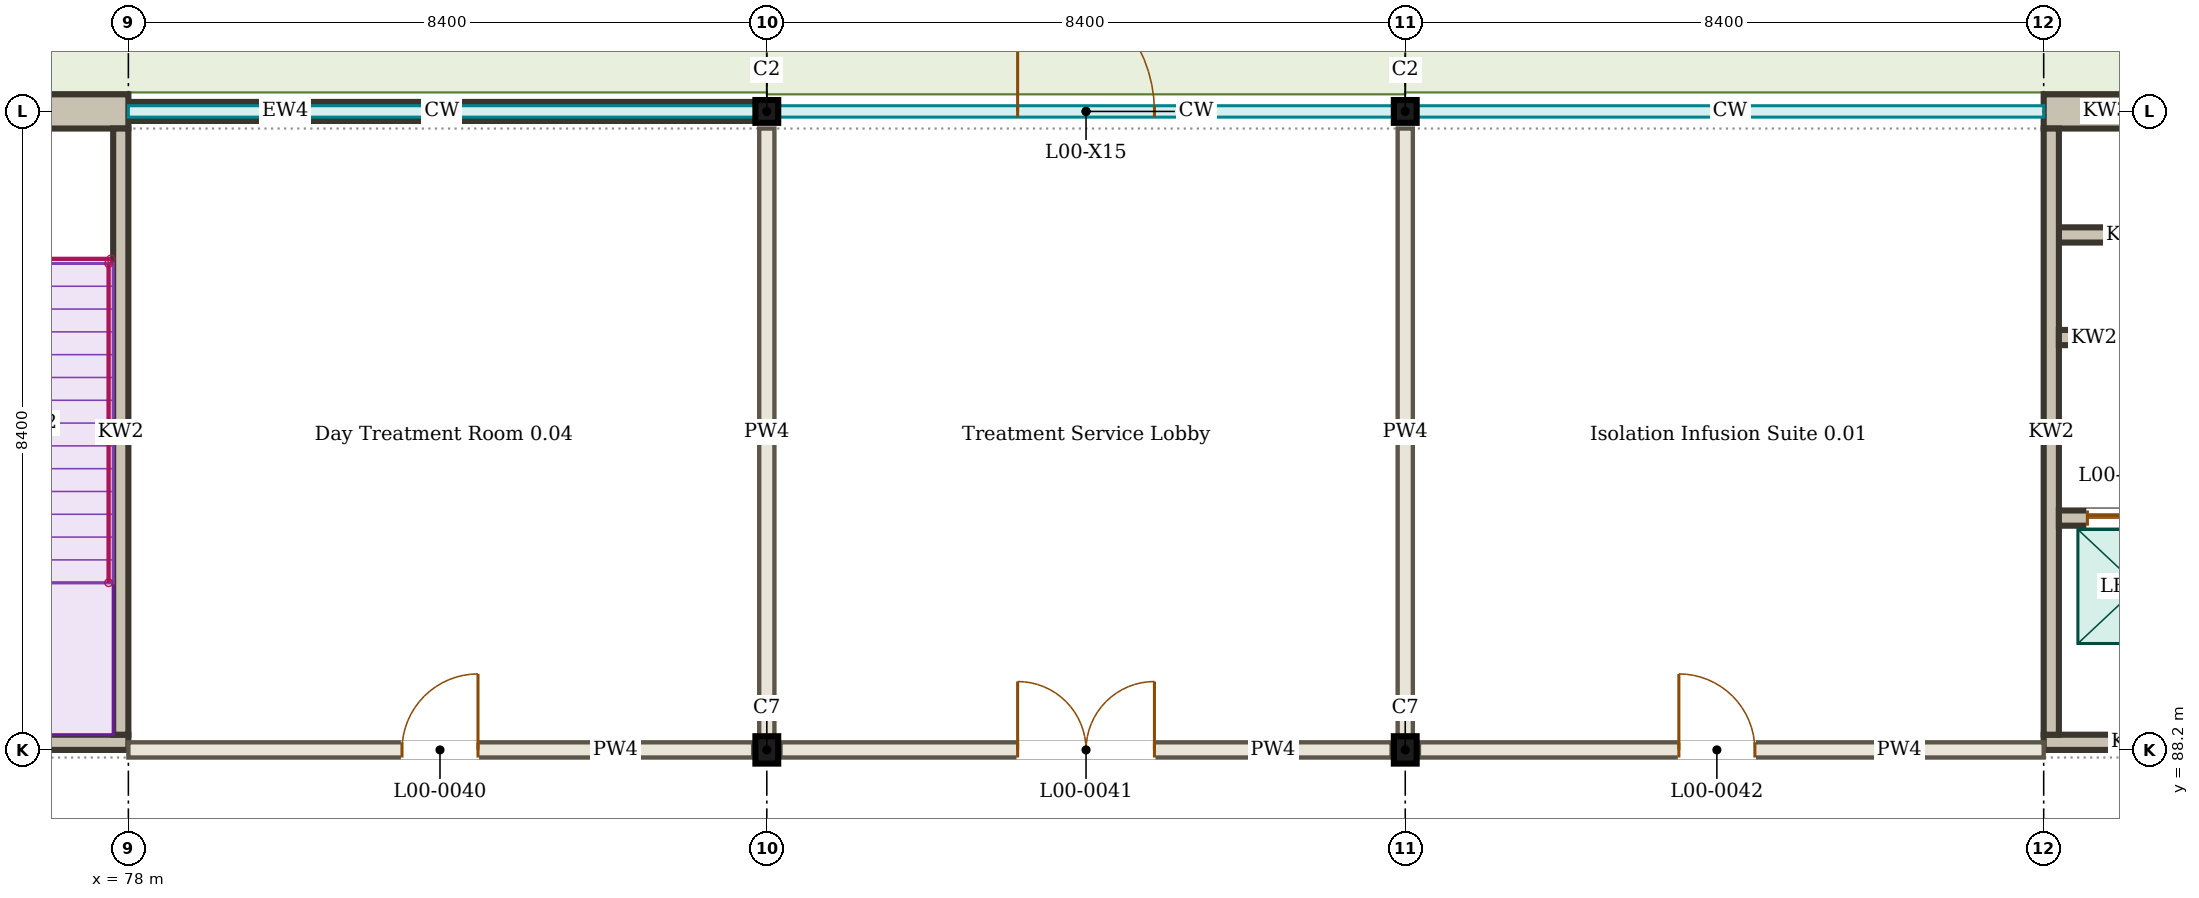
"""IFC4 building model, lengths in metres.
Left out: names, types, materials, properties, quantities, classifications, styles, units other than length and angle.
Written with IfcOpenShell. Run it as: python <this file> out.ifc"""

import sys

from ifc_helpers import new_model, si_unit, direction, frame, frame_2d, origin, origin_2d, place, context, subcontext, project, spatial, rectangle, i_section, extrude, element, fill, save


model = new_model("IFC4")
c1 = context("Model", 3, precision=1e-05, world=origin(), true_north=direction((0.0, 1.0)))
c2 = subcontext(c1, "Body", "Model", "MODEL_VIEW")
j1 = project(units=[si_unit("LENGTHUNIT", "METRE"), si_unit("PLANEANGLEUNIT", "RADIAN")], contexts=[c1])
p1 = place(None, origin())
s1 = spatial("IfcSite", under=j1, at=p1, CompositionType="ELEMENT")
p2 = place(p1, origin())
s2 = spatial("IfcBuilding", under=s1, at=p2, CompositionType="ELEMENT")
p3 = place(p2, origin())
s3 = spatial("IfcBuildingStorey", under=s2, at=p3, CompositionType="ELEMENT", Elevation=0.0)
for number, where, z_axis, x_axis in (
    (1, (86.4, 88.2, 0.0), (0.0, 0.0, 1.0), (1.0, 0.0, 0.0)),
    (2, (94.8, 88.2, 0.0), (0.0, 0.0, 1.0), (1.0, 0.0, 0.0)),
):
    element("IfcColumn", number, at=place(p3, frame(where, z_axis=z_axis, x_axis=x_axis)), inside=s3, PredefinedType="COLUMN", context=c2, shape_type="SweptSolid", body=[
        extrude(i_section(OverallWidth=0.3, OverallDepth=0.36, WebThickness=0.012, FlangeThickness=0.022, FilletRadius=0.027, at=origin_2d()), origin(), (0.0, 0.0, 1.0), 4.5),
    ])
for number, where, z_axis, x_axis in (
    (3, (86.4, 96.6, 0.0), (0.0, 0.0, 1.0), (1.0, 0.0, 0.0)),
    (4, (94.8, 96.6, 0.0), (0.0, 0.0, 1.0), (1.0, 0.0, 0.0)),
):
    element("IfcColumn", number, at=place(p3, frame(where, z_axis=z_axis, x_axis=x_axis)), inside=s3, PredefinedType="COLUMN", context=c2, shape_type="SweptSolid", body=[
        extrude(i_section(OverallWidth=0.3, OverallDepth=0.3, WebThickness=0.011, FlangeThickness=0.019, FilletRadius=0.027, at=origin_2d()), origin(), (0.0, 0.0, 1.0), 4.5),
    ])
p4 = place(p3, frame((78.0, 96.6, 0.0), z_axis=(0.0, 0.0, 1.0), x_axis=(1.0, 0.0, 0.0)))
e5 = element("IfcWall", 5, at=p4, inside=s3, PredefinedType="SOLIDWALL", context=c2, shape_type="SweptSolid", body=[
    extrude(rectangle(XDim=8.25, YDim=0.25, at=frame_2d((4.125, 0.0))), origin(), (0.0, 0.0, 1.0), 0.45),
])
for number, where, z_axis, x_axis in (
    (6, (78.0, 96.76, 3.87), (0.0, 0.0, 1.0), (1.0, 0.0, 0.0)),
    (7, (86.55, 96.76, 3.87), (0.0, 0.0, 1.0), (1.0, 0.0, 0.0)),
):
    element("IfcWall", number, at=place(p3, frame(where, z_axis=z_axis, x_axis=x_axis)), inside=s3, PredefinedType="SOLIDWALL", context=c2, shape_type="SweptSolid", body=[
        extrude(rectangle(XDim=8.25, YDim=0.13, at=frame_2d((4.125, 0.0))), origin(), (0.0, 0.0, 1.0), 0.63),
    ])
p5 = place(p3, frame((78.0, 88.2, 0.0), z_axis=(0.0, 0.0, 1.0), x_axis=(1.0, 0.0, 0.0)))
e8 = element("IfcWall", 8, at=p5, inside=s3, PredefinedType="PARTITIONING", context=c2, shape_type="SweptSolid", body=[
    extrude(rectangle(XDim=8.22, YDim=0.2, at=frame_2d((4.11, 0.0))), origin(), (0.0, 0.0, 1.0), 3.8),
])
p6 = place(p5, frame((3.6, 0.0, 0.0)))
e9 = element("IfcOpeningElement", 9, at=p6, cuts=e8, PredefinedType="OPENING", context=c2, shape_type="SweptSolid", body=[
    extrude(rectangle(XDim=1.0, YDim=2.1, at=frame_2d((0.5, 1.05))), frame((0.0, 0.11, 0.0), z_axis=(0.0, -1.0, 0.0), x_axis=(1.0, 0.0, 0.0)), (0.0, 0.0, 1.0), 0.22),
])
p7 = place(p3, frame((86.58, 88.2, 0.0), z_axis=(0.0, 0.0, 1.0), x_axis=(1.0, 0.0, 0.0)))
e10 = element("IfcWall", 10, at=p7, inside=s3, PredefinedType="PARTITIONING", context=c2, shape_type="SweptSolid", body=[
    extrude(rectangle(XDim=8.04, YDim=0.2, at=frame_2d((4.02, 0.0))), origin(), (0.0, 0.0, 1.0), 3.8),
])
p8 = place(p7, frame((3.12, 0.0, 0.0)))
e11 = element("IfcOpeningElement", 11, at=p8, cuts=e10, PredefinedType="OPENING", context=c2, shape_type="SweptSolid", body=[
    extrude(rectangle(XDim=1.8, YDim=2.1, at=frame_2d((0.9, 1.05))), frame((0.0, 0.11, 0.0), z_axis=(0.0, -1.0, 0.0), x_axis=(1.0, 0.0, 0.0)), (0.0, 0.0, 1.0), 0.22),
])
p9 = place(p3, frame((94.98, 88.2, 0.0), z_axis=(0.0, 0.0, 1.0), x_axis=(1.0, 0.0, 0.0)))
e12 = element("IfcWall", 12, at=p9, inside=s3, PredefinedType="PARTITIONING", context=c2, shape_type="SweptSolid", body=[
    extrude(rectangle(XDim=8.22, YDim=0.2, at=frame_2d((4.11, 0.0))), origin(), (0.0, 0.0, 1.0), 3.8),
])
p10 = place(p9, frame((3.42, 0.0, 0.0)))
e13 = element("IfcOpeningElement", 13, at=p10, cuts=e12, PredefinedType="OPENING", context=c2, shape_type="SweptSolid", body=[
    extrude(rectangle(XDim=1.0, YDim=2.1, at=frame_2d((0.5, 1.05))), frame((0.0, 0.11, 0.0), z_axis=(0.0, -1.0, 0.0), x_axis=(1.0, 0.0, 0.0)), (0.0, 0.0, 1.0), 0.22),
])
for number, where, z_axis, x_axis in (
    (14, (86.4, 88.38, 0.0), (0.0, 0.0, 1.0), (0.0, 1.0, 0.0)),
    (15, (94.8, 88.38, 0.0), (0.0, 0.0, 1.0), (0.0, 1.0, 0.0)),
):
    element("IfcWall", number, at=place(p3, frame(where, z_axis=z_axis, x_axis=x_axis)), inside=s3, PredefinedType="PARTITIONING", context=c2, shape_type="SweptSolid", body=[
        extrude(rectangle(XDim=7.995, YDim=0.2, at=frame_2d((3.998, 0.0))), origin(), (0.0, 0.0, 1.0), 3.8),
    ])
p11 = place(p3, frame((111.6, 88.3, 0.0), z_axis=(0.0, 0.0, 1.0), x_axis=(-1.0, 0.0, 0.0)))
e16 = element("IfcWall", 16, at=p11, inside=s3, PredefinedType="SOLIDWALL", context=c2, shape_type="SweptSolid", body=[
    extrude(rectangle(XDim=8.4, YDim=0.2, at=frame_2d((4.2, 0.0))), origin(), (0.0, 0.0, 1.0), 4.5),
])
p12 = place(p11, frame((4.725, 0.0, 0.0)))
e17 = element("IfcOpeningElement", 17, at=p12, cuts=e16, PredefinedType="OPENING", context=c2, shape_type="SweptSolid", body=[
    extrude(rectangle(XDim=1.3, YDim=2.1, at=frame_2d((0.65, 1.05))), frame((0.0, 0.11, 0.0), z_axis=(0.0, -1.0, 0.0), x_axis=(1.0, 0.0, 0.0)), (0.0, 0.0, 1.0), 0.22),
])
p13 = place(p3, frame((111.825, 96.6, 0.0), z_axis=(0.0, 0.0, 1.0), x_axis=(-1.0, 0.0, 0.0)))
e18 = element("IfcWall", 18, at=p13, inside=s3, PredefinedType="SOLIDWALL", context=c2, shape_type="SweptSolid", body=[
    extrude(rectangle(XDim=8.625, YDim=0.45, at=frame_2d((4.312, 0.0))), origin(), (0.0, 0.0, 1.0), 4.5),
])
p14 = place(p13, frame((1.875, 0.0, 0.0)))
e19 = element("IfcOpeningElement", 19, at=p14, cuts=e18, PredefinedType="OPENING", context=c2, shape_type="SweptSolid", body=[
    extrude(rectangle(XDim=1.3, YDim=2.1, at=frame_2d((0.65, 1.05))), frame((0.0, 0.235, 0.0), z_axis=(0.0, -1.0, 0.0), x_axis=(1.0, 0.0, 0.0)), (0.0, 0.0, 1.0), 0.47),
])
p15 = place(p3, frame((103.3, 88.4, 0.0), z_axis=(0.0, 0.0, 1.0), x_axis=(0.0, 1.0, 0.0)))
e20 = element("IfcWall", 20, at=p15, inside=s3, PredefinedType="SOLIDWALL", context=c2, shape_type="SweptSolid", body=[
    extrude(rectangle(XDim=7.975, YDim=0.2, at=frame_2d((3.988, 0.0))), origin(), (0.0, 0.0, 1.0), 4.5),
])
p16 = place(p3, frame((105.25, 91.25, 0.0), z_axis=(0.0, 0.0, 1.0), x_axis=(-1.0, 0.0, 0.0)))
e21 = element("IfcWall", 21, at=p16, inside=s3, PredefinedType="SOLIDWALL", context=c2, shape_type="SweptSolid", body=[
    extrude(rectangle(XDim=1.85, YDim=0.2, at=frame_2d((0.925, 0.0))), origin(), (0.0, 0.0, 1.0), 4.5),
])
p17 = place(p16, frame((0.375, 0.0, 0.0)))
e22 = element("IfcOpeningElement", 22, at=p17, cuts=e21, PredefinedType="OPENING", context=c2, shape_type="SweptSolid", body=[
    extrude(rectangle(XDim=1.1, YDim=2.1, at=frame_2d((0.55, 1.05))), frame((0.0, 0.11, 0.0), z_axis=(0.0, -1.0, 0.0), x_axis=(1.0, 0.0, 0.0)), (0.0, 0.0, 1.0), 0.22),
])
for number, where, z_axis, x_axis in (
    (23, (105.25, 93.625, 0.0), (0.0, 0.0, 1.0), (-1.0, 0.0, 0.0)),
    (24, (105.25, 94.975, 0.0), (0.0, 0.0, 1.0), (-1.0, 0.0, 0.0)),
):
    element("IfcWall", number, at=place(p3, frame(where, z_axis=z_axis, x_axis=x_axis)), inside=s3, PredefinedType="SOLIDWALL", context=c2, shape_type="SweptSolid", body=[
        extrude(rectangle(XDim=1.85, YDim=0.2, at=frame_2d((0.925, 0.0))), origin(), (0.0, 0.0, 1.0), 4.35),
    ])
p18 = place(p3, frame((78.0, 88.3, 0.0), z_axis=(0.0, 0.0, 1.0), x_axis=(-1.0, 0.0, 0.0)))
e25 = element("IfcWall", 25, at=p18, inside=s3, PredefinedType="SOLIDWALL", context=c2, shape_type="SweptSolid", body=[
    extrude(rectangle(XDim=8.4, YDim=0.2, at=frame_2d((4.2, 0.0))), origin(), (0.0, 0.0, 1.0), 4.5),
])
p19 = place(p18, frame((4.725, 0.0, 0.0)))
e26 = element("IfcOpeningElement", 26, at=p19, cuts=e25, PredefinedType="OPENING", context=c2, shape_type="SweptSolid", body=[
    extrude(rectangle(XDim=1.3, YDim=2.1, at=frame_2d((0.65, 1.05))), frame((0.0, 0.11, 0.0), z_axis=(0.0, -1.0, 0.0), x_axis=(1.0, 0.0, 0.0)), (0.0, 0.0, 1.0), 0.22),
])
p20 = place(p3, frame((78.0, 96.6, 0.0), z_axis=(0.0, 0.0, 1.0), x_axis=(-1.0, 0.0, 0.0)))
e27 = element("IfcWall", 27, at=p20, inside=s3, PredefinedType="SOLIDWALL", context=c2, shape_type="SweptSolid", body=[
    extrude(rectangle(XDim=8.4, YDim=0.45, at=frame_2d((4.2, 0.0))), origin(), (0.0, 0.0, 1.0), 4.5),
])
p21 = place(p20, frame((1.65, 0.0, 0.0)))
e28 = element("IfcOpeningElement", 28, at=p21, cuts=e27, PredefinedType="OPENING", context=c2, shape_type="SweptSolid", body=[
    extrude(rectangle(XDim=1.3, YDim=2.1, at=frame_2d((0.65, 1.05))), frame((0.0, 0.235, 0.0), z_axis=(0.0, -1.0, 0.0), x_axis=(1.0, 0.0, 0.0)), (0.0, 0.0, 1.0), 0.47),
])
p22 = place(p3, frame((77.9, 88.4, 0.0), z_axis=(0.0, 0.0, 1.0), x_axis=(0.0, 1.0, 0.0)))
e29 = element("IfcWall", 29, at=p22, inside=s3, PredefinedType="SOLIDWALL", context=c2, shape_type="SweptSolid", body=[
    extrude(rectangle(XDim=7.975, YDim=0.2, at=frame_2d((3.988, 0.0))), origin(), (0.0, 0.0, 1.0), 4.5),
])
p23 = place(p3, frame((86.55, 96.6, 0.0), z_axis=(0.0, 0.0, 1.0), x_axis=(1.0, 0.0, 0.0)))
p24 = place(p23, frame((3.15, 0.0, 0.0)))
p25 = place(p24, origin())
e30 = element("IfcDoor", 30, at=p25, inside=s3, OperationType="SINGLE_SWING_LEFT", PredefinedType="DOOR", context=c2, shape_type="SweptSolid", body=[
    extrude(rectangle(XDim=1.8, YDim=2.1, at=frame_2d((0.9, 1.05))), frame((0.0, 0.025, 0.0), z_axis=(0.0, -1.0, 0.0), x_axis=(1.0, 0.0, 0.0)), (0.0, 0.0, 1.0), 0.05),
])
p26 = place(p6, origin())
e31 = element("IfcDoor", 31, at=p26, inside=s3, OperationType="SINGLE_SWING_RIGHT", PredefinedType="DOOR", context=c2, shape_type="SweptSolid", body=[
    extrude(rectangle(XDim=1.0, YDim=2.1, at=frame_2d((0.5, 1.05))), frame((0.0, 0.025, 0.0), z_axis=(0.0, -1.0, 0.0), x_axis=(1.0, 0.0, 0.0)), (0.0, 0.0, 1.0), 0.05),
])
fill(e9, e31)
p27 = place(p8, origin())
e32 = element("IfcDoor", 32, at=p27, inside=s3, OperationType="DOUBLE_DOOR_SINGLE_SWING", PredefinedType="DOOR", context=c2, shape_type="SweptSolid", body=[
    extrude(rectangle(XDim=1.8, YDim=2.1, at=frame_2d((0.9, 1.05))), frame((0.0, 0.025, 0.0), z_axis=(0.0, -1.0, 0.0), x_axis=(1.0, 0.0, 0.0)), (0.0, 0.0, 1.0), 0.05),
])
fill(e11, e32)
p28 = place(p10, origin())
e33 = element("IfcDoor", 33, at=p28, inside=s3, OperationType="SINGLE_SWING_LEFT", PredefinedType="DOOR", context=c2, shape_type="SweptSolid", body=[
    extrude(rectangle(XDim=1.0, YDim=2.1, at=frame_2d((0.5, 1.05))), frame((0.0, 0.025, 0.0), z_axis=(0.0, -1.0, 0.0), x_axis=(1.0, 0.0, 0.0)), (0.0, 0.0, 1.0), 0.05),
])
fill(e13, e33)
p29 = place(p17, origin())
e34 = element("IfcDoor", 34, at=p29, inside=s3, OperationType="DOUBLE_DOOR_SLIDING", PredefinedType="DOOR", context=c2, shape_type="SweptSolid", body=[
    extrude(rectangle(XDim=1.1, YDim=2.1, at=frame_2d((0.55, 1.05))), frame((0.0, 0.025, 0.0), z_axis=(0.0, -1.0, 0.0), x_axis=(1.0, 0.0, 0.0)), (0.0, 0.0, 1.0), 0.05),
])
fill(e22, e34)
save(model, sys.argv[1])
